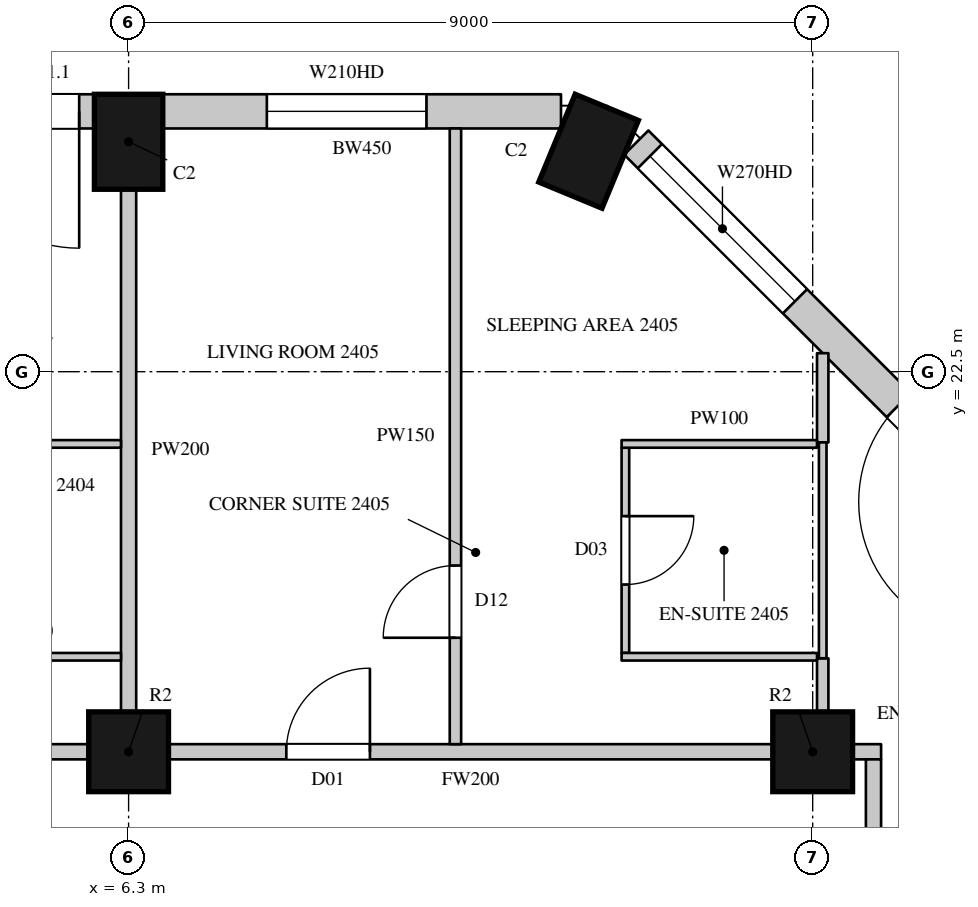
"""IFC4 building model, lengths in metres.
Left out: names, types, materials, properties, quantities, classifications, styles, units other than length and angle.
Written with IfcOpenShell. Run it as: python <this file> out.ifc"""

import sys

from ifc_helpers import new_model, si_unit, direction, frame, frame_2d, origin, origin_2d, place, context, subcontext, project, spatial, rectangle, circle, extrude, element, fill, save


model = new_model("IFC4")
c1 = context("Model", 3, precision=1e-05, world=origin(), true_north=direction((0.0, 1.0)))
c2 = subcontext(c1, "Body", "Model", "MODEL_VIEW")
j1 = project(units=[si_unit("LENGTHUNIT", "METRE"), si_unit("PLANEANGLEUNIT", "RADIAN")], contexts=[c1])
p1 = place(None, origin())
s1 = spatial("IfcSite", under=j1, at=p1, CompositionType="ELEMENT")
p2 = place(p1, origin())
s2 = spatial("IfcBuilding", under=s1, at=p2, CompositionType="ELEMENT")
p3 = place(p2, frame((0.0, 0.0, 116.7)))
s3 = spatial("IfcBuildingStorey", under=s2, at=p3, CompositionType="ELEMENT", Elevation=116.7)
for number, where, z_axis, x_axis in (
    (1, (12.352, 25.4, 0.0), (0.0, 0.0, 1.0), (-0.924, 0.383, 0.0)),
    (2, (6.3, 25.525, 0.0), (0.0, 0.0, 1.0), (-1.0, 0.0, 0.0)),
):
    element("IfcColumn", number, at=place(p3, frame(where, z_axis=z_axis, x_axis=x_axis)), inside=s3, PredefinedType="COLUMN", context=c2, shape_type="SweptSolid", body=[
        extrude(rectangle(XDim=0.9, YDim=1.25, at=origin_2d()), origin(), (0.0, 0.0, 1.0), 3.6),
    ])
for number, where, z_axis, x_axis in (
    (3, (6.3, 17.5, 0.0), (0.0, 0.0, 1.0), (1.0, 0.0, 0.0)),
    (4, (15.3, 17.5, 0.0), (0.0, 0.0, 1.0), (1.0, 0.0, 0.0)),
):
    element("IfcColumn", number, at=place(p3, frame(where, z_axis=z_axis, x_axis=x_axis)), inside=s3, PredefinedType="COLUMN", context=c2, shape_type="SweptSolid", body=[
        extrude(circle(Radius=0.525, at=origin_2d()), origin(), (0.0, 0.0, 1.0), 3.6),
    ])
p4 = place(p3, frame((18.229, 20.265, 0.0), z_axis=(0.0, 0.0, 1.0), x_axis=(-0.707106781187, 0.707106781187, 0.0)))
e5 = element("IfcWall", 5, at=p4, inside=s3, PredefinedType="SOLIDWALL", context=c2, shape_type="SweptSolid", body=[
    extrude(rectangle(XDim=7.424, YDim=0.45, at=frame_2d((3.712, 0.0))), origin(), (0.0, 0.0, 1.0), 3.3),
])
p5 = place(p4, frame((0.74, 0.0, 0.0)))
e6 = element("IfcOpeningElement", 6, at=p5, cuts=e5, PredefinedType="OPENING", context=c2, shape_type="SweptSolid", body=[
    extrude(rectangle(XDim=1.8, YDim=2.4, at=frame_2d((0.9, 1.2))), frame((0.0, 0.235, 0.0), z_axis=(0.0, -1.0, 0.0), x_axis=(1.0, 0.0, 0.0)), (0.0, 0.0, 1.0), 0.47),
])
p6 = place(p4, frame((4.471, 0.0, 1.05)))
e7 = element("IfcOpeningElement", 7, at=p6, cuts=e5, PredefinedType="OPENING", context=c2, shape_type="SweptSolid", body=[
    extrude(rectangle(XDim=2.7, YDim=2.0, at=frame_2d((1.35, 1.0))), frame((0.0, 0.235, 0.0), z_axis=(0.0, -1.0, 0.0), x_axis=(1.0, 0.0, 0.0)), (0.0, 0.0, 1.0), 0.47),
])
p7 = place(p3, frame((11.989, 25.925, 0.0), z_axis=(0.0, 0.0, 1.0), x_axis=(-1.0, 0.0, 0.0)))
e8 = element("IfcWall", 8, at=p7, inside=s3, PredefinedType="SOLIDWALL", context=c2, shape_type="SweptSolid", body=[
    extrude(rectangle(XDim=5.239, YDim=0.45, at=frame_2d((2.619, 0.0))), origin(), (0.0, 0.0, 1.0), 3.3),
])
p8 = place(p7, frame((1.77, 0.0, 1.05)))
e9 = element("IfcOpeningElement", 9, at=p8, cuts=e8, PredefinedType="OPENING", context=c2, shape_type="SweptSolid", body=[
    extrude(rectangle(XDim=2.1, YDim=2.0, at=frame_2d((1.05, 1.0))), frame((0.0, 0.235, 0.0), z_axis=(0.0, -1.0, 0.0), x_axis=(1.0, 0.0, 0.0)), (0.0, 0.0, 1.0), 0.47),
])
p9 = place(p3, frame((5.85, 25.925, 0.0), z_axis=(0.0, 0.0, 1.0), x_axis=(-1.0, 0.0, 0.0)))
e10 = element("IfcWall", 10, at=p9, inside=s3, PredefinedType="SOLIDWALL", context=c2, shape_type="SweptSolid", body=[
    extrude(rectangle(XDim=8.1, YDim=0.45, at=frame_2d((4.05, 0.0))), origin(), (0.0, 0.0, 1.0), 3.3),
])
p10 = place(p9, frame((0.2, 0.0, 0.0)))
e11 = element("IfcOpeningElement", 11, at=p10, cuts=e10, PredefinedType="OPENING", context=c2, shape_type="SweptSolid", body=[
    extrude(rectangle(XDim=1.8, YDim=2.4, at=frame_2d((0.9, 1.2))), frame((0.0, 0.235, 0.0), z_axis=(0.0, -1.0, 0.0), x_axis=(1.0, 0.0, 0.0)), (0.0, 0.0, 1.0), 0.47),
])
p11 = place(p9, frame((2.2, 0.0, 1.05)))
e12 = element("IfcOpeningElement", 12, at=p11, cuts=e10, PredefinedType="OPENING", context=c2, shape_type="SweptSolid", body=[
    extrude(rectangle(XDim=1.2, YDim=2.0, at=frame_2d((0.6, 1.0))), frame((0.0, 0.235, 0.0), z_axis=(0.0, -1.0, 0.0), x_axis=(1.0, 0.0, 0.0)), (0.0, 0.0, 1.0), 0.47),
])
p12 = place(p9, frame((4.7, 0.0, 0.0)))
e13 = element("IfcOpeningElement", 13, at=p12, cuts=e10, PredefinedType="OPENING", context=c2, shape_type="SweptSolid", body=[
    extrude(rectangle(XDim=1.8, YDim=2.4, at=frame_2d((0.9, 1.2))), frame((0.0, 0.235, 0.0), z_axis=(0.0, -1.0, 0.0), x_axis=(1.0, 0.0, 0.0)), (0.0, 0.0, 1.0), 0.47),
])
p13 = place(p9, frame((6.7, 0.0, 1.05)))
e14 = element("IfcOpeningElement", 14, at=p13, cuts=e10, PredefinedType="OPENING", context=c2, shape_type="SweptSolid", body=[
    extrude(rectangle(XDim=1.2, YDim=2.0, at=frame_2d((0.6, 1.0))), frame((0.0, 0.235, 0.0), z_axis=(0.0, -1.0, 0.0), x_axis=(1.0, 0.0, 0.0)), (0.0, 0.0, 1.0), 0.47),
])
p14 = place(p3, frame((16.486, 23.529, 0.0), z_axis=(0.0, 0.0, 1.0), x_axis=(-0.707022305137, 0.707191247145, 0.0)))
e15 = element("IfcWall", 15, at=p14, inside=s3, PredefinedType="SOLIDWALL", context=c2, shape_type="SweptSolid", body=[
    extrude(rectangle(XDim=1.445, YDim=0.45, at=frame_2d((0.723, 0.0))), origin(), (0.0, 0.0, 1.0), 0.6),
])
p15 = place(p3, frame((-2.175, 17.5, 0.0), z_axis=(0.0, 0.0, 1.0), x_axis=(1.0, 0.0, 0.0)))
e16 = element("IfcWall", 16, at=p15, inside=s3, PredefinedType="PARTITIONING", context=c2, shape_type="SweptSolid", body=[
    extrude(rectangle(XDim=7.95, YDim=0.2, at=frame_2d((3.975, 0.0))), origin(), (0.0, 0.0, 1.0), 2.75),
])
p16 = place(p15, frame((1.65, 0.0, 0.0)))
e17 = element("IfcOpeningElement", 17, at=p16, cuts=e16, PredefinedType="OPENING", context=c2, shape_type="SweptSolid", body=[
    extrude(rectangle(XDim=1.1, YDim=2.4, at=frame_2d((0.55, 1.2))), frame((0.0, 0.11, 0.0), z_axis=(0.0, -1.0, 0.0), x_axis=(1.0, 0.0, 0.0)), (0.0, 0.0, 1.0), 0.22),
])
p17 = place(p3, frame((6.825, 17.5, 0.0), z_axis=(0.0, 0.0, 1.0), x_axis=(1.0, 0.0, 0.0)))
e18 = element("IfcWall", 18, at=p17, inside=s3, PredefinedType="PARTITIONING", context=c2, shape_type="SweptSolid", body=[
    extrude(rectangle(XDim=7.95, YDim=0.2, at=frame_2d((3.975, 0.0))), origin(), (0.0, 0.0, 1.0), 2.75),
])
p18 = place(p17, frame((1.55, 0.0, 0.0)))
e19 = element("IfcOpeningElement", 19, at=p18, cuts=e18, PredefinedType="OPENING", context=c2, shape_type="SweptSolid", body=[
    extrude(rectangle(XDim=1.1, YDim=2.4, at=frame_2d((0.55, 1.2))), frame((0.0, 0.11, 0.0), z_axis=(0.0, -1.0, 0.0), x_axis=(1.0, 0.0, 0.0)), (0.0, 0.0, 1.0), 0.22),
])
p19 = place(p3, frame((15.825, 17.5, 0.0), z_axis=(0.0, 0.0, 1.0), x_axis=(1.0, 0.0, 0.0)))
e20 = element("IfcWall", 20, at=p19, inside=s3, PredefinedType="PARTITIONING", context=c2, shape_type="SweptSolid", body=[
    extrude(rectangle(XDim=0.375, YDim=0.2, at=frame_2d((0.188, 0.0))), origin(), (0.0, 0.0, 1.0), 3.3),
])
p20 = place(p3, frame((16.1, 4.75, 0.0), z_axis=(0.0, 0.0, 1.0), x_axis=(0.0, 1.0, 0.0)))
e21 = element("IfcWall", 21, at=p20, inside=s3, PredefinedType="PARTITIONING", context=c2, shape_type="SweptSolid", body=[
    extrude(rectangle(XDim=12.65, YDim=0.2, at=frame_2d((6.325, 0.0))), origin(), (0.0, 0.0, 1.0), 3.3),
])
p21 = place(p20, frame((0.5, 0.0, 0.0)))
e22 = element("IfcOpeningElement", 22, at=p21, cuts=e21, PredefinedType="OPENING", context=c2, shape_type="SweptSolid", body=[
    extrude(rectangle(XDim=0.95, YDim=2.2, at=frame_2d((0.475, 1.1))), frame((0.0, 0.11, 0.0), z_axis=(0.0, -1.0, 0.0), x_axis=(1.0, 0.0, 0.0)), (0.0, 0.0, 1.0), 0.22),
])
p22 = place(p20, frame((6.9, 0.0, 0.0)))
e23 = element("IfcOpeningElement", 23, at=p22, cuts=e21, PredefinedType="OPENING", context=c2, shape_type="SweptSolid", body=[
    extrude(rectangle(XDim=0.95, YDim=2.2, at=frame_2d((0.475, 1.1))), frame((0.0, 0.11, 0.0), z_axis=(0.0, -1.0, 0.0), x_axis=(1.0, 0.0, 0.0)), (0.0, 0.0, 1.0), 0.22),
])
p23 = place(p3, frame((10.6, 17.6, 0.0), z_axis=(0.0, 0.0, 1.0), x_axis=(0.0, 1.0, 0.0)))
e24 = element("IfcWall", 24, at=p23, inside=s3, PredefinedType="PARTITIONING", context=c2, shape_type="SweptSolid", body=[
    extrude(rectangle(XDim=8.1, YDim=0.15, at=frame_2d((4.05, 0.0))), origin(), (0.0, 0.0, 1.0), 3.3),
])
p24 = place(p23, frame((1.4, 0.0, 0.0)))
e25 = element("IfcOpeningElement", 25, at=p24, cuts=e24, PredefinedType="OPENING", context=c2, shape_type="SweptSolid", body=[
    extrude(rectangle(XDim=0.95, YDim=2.2, at=frame_2d((0.475, 1.1))), frame((0.0, 0.085, 0.0), z_axis=(0.0, -1.0, 0.0), x_axis=(1.0, 0.0, 0.0)), (0.0, 0.0, 1.0), 0.17),
])
p25 = place(p3, frame((15.432, 18.016, 0.0), z_axis=(0.0, 0.0, 1.0), x_axis=(0.0, 1.0, 0.0)))
e26 = element("IfcWall", 26, at=p25, inside=s3, PredefinedType="PARTITIONING", context=c2, shape_type="SweptSolid", body=[
    extrude(rectangle(XDim=0.714, YDim=0.15, at=frame_2d((0.357, 0.0))), origin(), (0.0, 0.0, 1.0), 3.3),
])
p26 = place(p3, frame((15.432, 21.57, 0.0), z_axis=(0.0, 0.0, 1.0), x_axis=(0.0, 1.0, 0.0)))
e27 = element("IfcWall", 27, at=p26, inside=s3, PredefinedType="PARTITIONING", context=c2, shape_type="SweptSolid", body=[
    extrude(rectangle(XDim=1.174, YDim=0.15, at=frame_2d((0.587, 0.0))), origin(), (0.0, 0.0, 1.0), 3.3),
])
p27 = place(p3, frame((6.3, 18.025, 0.0), z_axis=(0.0, 0.0, 1.0), x_axis=(0.0, 1.0, 0.0)))
e28 = element("IfcWall", 28, at=p27, inside=s3, PredefinedType="PARTITIONING", context=c2, shape_type="SweptSolid", body=[
    extrude(rectangle(XDim=6.875, YDim=0.2, at=frame_2d((3.438, 0.0))), origin(), (0.0, 0.0, 1.0), 2.75),
])
for number, where, z_axis, x_axis in (
    (29, (3.654, 18.75, 0.0), (0.0, 0.0, 1.0), (1.0, 0.0, 0.0)),
    (30, (3.654, 21.55, 0.0), (0.0, 0.0, 1.0), (1.0, 0.0, 0.0)),
):
    element("IfcWall", number, at=place(p3, frame(where, z_axis=z_axis, x_axis=x_axis)), inside=s3, PredefinedType="PARTITIONING", context=c2, shape_type="SweptSolid", body=[
        extrude(rectangle(XDim=2.546, YDim=0.1, at=frame_2d((1.273, 0.0))), origin(), (0.0, 0.0, 1.0), 3.3),
    ])
p28 = place(p3, frame((12.836, 18.8, 0.0), z_axis=(0.0, 0.0, 1.0), x_axis=(0.0, 1.0, 0.0)))
e31 = element("IfcWall", 31, at=p28, inside=s3, PredefinedType="PARTITIONING", context=c2, shape_type="SweptSolid", body=[
    extrude(rectangle(XDim=2.7, YDim=0.1, at=frame_2d((1.35, 0.0))), origin(), (0.0, 0.0, 1.0), 3.3),
])
p29 = place(p28, frame((0.9, 0.0, 0.0)))
e32 = element("IfcOpeningElement", 32, at=p29, cuts=e31, PredefinedType="OPENING", context=c2, shape_type="SweptSolid", body=[
    extrude(rectangle(XDim=0.9, YDim=2.2, at=frame_2d((0.45, 1.1))), frame((0.0, 0.06, 0.0), z_axis=(0.0, -1.0, 0.0), x_axis=(1.0, 0.0, 0.0)), (0.0, 0.0, 1.0), 0.12),
])
for number, where, z_axis, x_axis in (
    (33, (12.786, 18.75, 0.0), (0.0, 0.0, 1.0), (1.0, 0.0, 0.0)),
    (34, (12.786, 21.55, 0.0), (0.0, 0.0, 1.0), (1.0, 0.0, 0.0)),
):
    element("IfcWall", number, at=place(p3, frame(where, z_axis=z_axis, x_axis=x_axis)), inside=s3, PredefinedType="PARTITIONING", context=c2, shape_type="SweptSolid", body=[
        extrude(rectangle(XDim=2.571, YDim=0.1, at=frame_2d((1.286, 0.0))), origin(), (0.0, 0.0, 1.0), 3.3),
    ])
p30 = place(p3, frame((15.432, 18.73, 0.0), z_axis=(0.0, 0.0, 1.0), x_axis=(0.0, 1.0, 0.0)))
e35 = element("IfcWall", 35, at=p30, inside=s3, PredefinedType="PARTITIONING", context=c2, shape_type="SweptSolid", body=[
    extrude(rectangle(XDim=2.84, YDim=0.1, at=frame_2d((1.42, 0.0))), origin(), (0.0, 0.0, 1.0), 3.3),
])
p31 = place(p5, origin())
e36 = element("IfcDoor", 36, at=p31, inside=s3, OperationType="SLIDING_TO_LEFT", PredefinedType="DOOR", context=c2, shape_type="SweptSolid", body=[
    extrude(rectangle(XDim=1.8, YDim=2.4, at=frame_2d((0.9, 1.2))), frame((0.0, 0.13, 0.0), z_axis=(0.0, -1.0, 0.0), x_axis=(1.0, 0.0, 0.0)), (0.0, 0.0, 1.0), 0.05),
])
fill(e6, e36)
p32 = place(p6, origin())
e37 = element("IfcWindow", 37, at=p32, inside=s3, PartitioningType="SINGLE_PANEL", PredefinedType="WINDOW", context=c2, shape_type="SweptSolid", body=[
    extrude(rectangle(XDim=2.7, YDim=2.0, at=frame_2d((1.35, 1.0))), frame((0.0, 0.135, 0.0), z_axis=(0.0, -1.0, 0.0), x_axis=(1.0, 0.0, 0.0)), (0.0, 0.0, 1.0), 0.06),
])
fill(e7, e37)
p33 = place(p10, origin())
e38 = element("IfcDoor", 38, at=p33, inside=s3, OperationType="SLIDING_TO_LEFT", PredefinedType="DOOR", context=c2, shape_type="SweptSolid", body=[
    extrude(rectangle(XDim=1.8, YDim=2.4, at=frame_2d((0.9, 1.2))), frame((0.0, 0.13, 0.0), z_axis=(0.0, -1.0, 0.0), x_axis=(1.0, 0.0, 0.0)), (0.0, 0.0, 1.0), 0.05),
])
fill(e11, e38)
p34 = place(p18, origin())
e39 = element("IfcDoor", 39, at=p34, inside=s3, OperationType="SINGLE_SWING_RIGHT", PredefinedType="DOOR", context=c2, shape_type="SweptSolid", body=[
    extrude(rectangle(XDim=1.1, YDim=2.4, at=frame_2d((0.55, 1.2))), frame((0.0, 0.025, 0.0), z_axis=(0.0, -1.0, 0.0), x_axis=(1.0, 0.0, 0.0)), (0.0, 0.0, 1.0), 0.05),
])
fill(e19, e39)
p35 = place(p24, origin())
e40 = element("IfcDoor", 40, at=p35, inside=s3, OperationType="SINGLE_SWING_LEFT", PredefinedType="DOOR", context=c2, shape_type="SweptSolid", body=[
    extrude(rectangle(XDim=0.95, YDim=2.2, at=frame_2d((0.475, 1.1))), frame((0.0, 0.025, 0.0), z_axis=(0.0, -1.0, 0.0), x_axis=(1.0, 0.0, 0.0)), (0.0, 0.0, 1.0), 0.05),
])
fill(e25, e40)
p36 = place(p29, origin())
e41 = element("IfcDoor", 41, at=p36, inside=s3, OperationType="SINGLE_SWING_LEFT", PredefinedType="DOOR", context=c2, shape_type="SweptSolid", body=[
    extrude(rectangle(XDim=0.9, YDim=2.2, at=frame_2d((0.45, 1.1))), frame((0.0, 0.025, 0.0), z_axis=(0.0, -1.0, 0.0), x_axis=(1.0, 0.0, 0.0)), (0.0, 0.0, 1.0), 0.05),
])
fill(e32, e41)
p37 = place(p8, origin())
e42 = element("IfcWindow", 42, at=p37, inside=s3, PartitioningType="SINGLE_PANEL", PredefinedType="WINDOW", context=c2, shape_type="SweptSolid", body=[
    extrude(rectangle(XDim=2.1, YDim=2.0, at=frame_2d((1.05, 1.0))), frame((0.0, 0.135, 0.0), z_axis=(0.0, -1.0, 0.0), x_axis=(1.0, 0.0, 0.0)), (0.0, 0.0, 1.0), 0.06),
])
fill(e9, e42)
save(model, sys.argv[1])
